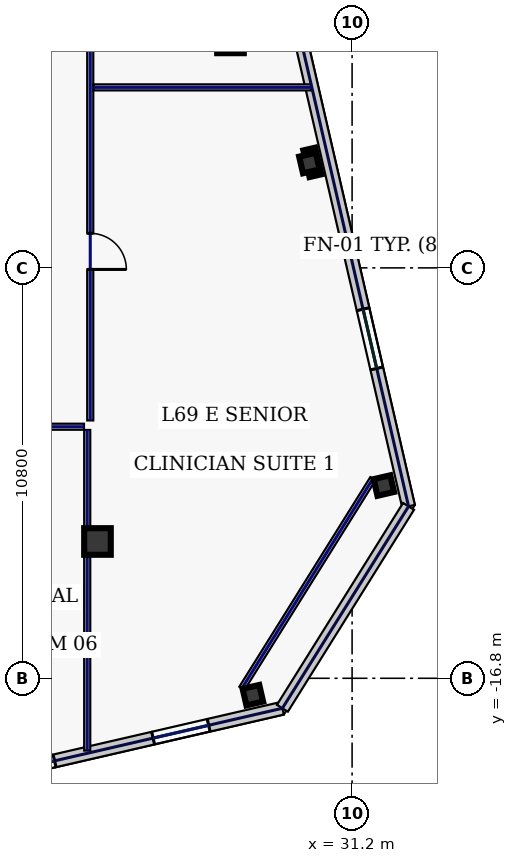
"""IFC4 building model, lengths in metres.
Left out: names, types, materials, properties, quantities, classifications, styles, units other than length and angle.
Written with IfcOpenShell. Run it as: python <this file> out.ifc"""

import sys

from ifc_helpers import new_model, si_unit, direction, frame, frame_2d, origin, origin_2d, place, context, subcontext, project, spatial, rectangle, hollow_rectangle, extrude, element, fill, save


model = new_model("IFC4")
c1 = context("Model", 3, precision=1e-05, world=origin(), true_north=direction((0.0, 1.0)))
c2 = subcontext(c1, "Body", "Model", "MODEL_VIEW")
j1 = project(units=[si_unit("LENGTHUNIT", "METRE"), si_unit("PLANEANGLEUNIT", "RADIAN")], contexts=[c1])
p1 = place(None, origin())
s1 = spatial("IfcSite", under=j1, at=p1, CompositionType="ELEMENT")
p2 = place(p1, origin())
s2 = spatial("IfcBuilding", under=s1, at=p2, CompositionType="ELEMENT")
p3 = place(p2, frame((0.0, 0.0, 297.0)))
s3 = spatial("IfcBuildingStorey", under=s2, at=p3, CompositionType="ELEMENT", Elevation=297.0)
for number, where, z_axis, x_axis in (
    (1, (24.5, -13.2, 0.0), (0.0, 0.0, 1.0), (1.0, 0.0, 0.0)),
    (2, (28.0, 0.0, 0.0), (0.0, 0.0, 1.0), (1.0, 0.0, 0.0)),
):
    element("IfcColumn", number, at=place(p3, frame(where, z_axis=z_axis, x_axis=x_axis)), inside=s3, PredefinedType="COLUMN", context=c2, shape_type="SweptSolid", body=[
        extrude(hollow_rectangle(XDim=0.7, YDim=0.7, WallThickness=0.032, at=origin_2d()), origin(), (0.0, 0.0, 1.0), 3.74),
    ])
for number, where, z_axis, x_axis in (
    (3, (28.589, -17.245, 0.0), (0.0, 0.0, 1.0), (0.974, 0.225, 0.0)),
    (4, (32.036, -11.728, 0.0), (0.0, 0.0, 1.0), (0.974, 0.225, 0.0)),
    (5, (30.077, -3.241, 0.0), (0.0, 0.0, 1.0), (0.974, 0.225, 0.0)),
):
    element("IfcColumn", number, at=place(p3, frame(where, z_axis=z_axis, x_axis=x_axis)), inside=s3, PredefinedType="COLUMN", context=c2, shape_type="SweptSolid", body=[
        extrude(hollow_rectangle(XDim=0.45, YDim=0.45, WallThickness=0.022, at=origin_2d()), origin(), (0.0, 0.0, 1.0), 3.74),
    ])
p4 = place(p3, frame((12.445, -21.495, 0.0), z_axis=(0.0, 0.0, 1.0), x_axis=(0.974369392164, 0.224953967767, 0.0)))
e6 = element("IfcWall", 6, at=p4, inside=s3, PredefinedType="STANDARD", context=c2, shape_type="SweptSolid", body=[
    extrude(rectangle(XDim=17.366, YDim=0.34, at=frame_2d((8.683, 0.0))), origin(), (0.0, 0.0, 1.0), 3.74),
])
p5 = place(p4, frame((2.729, 0.0, 0.9)))
e7 = element("IfcOpeningElement", 7, at=p5, cuts=e6, PredefinedType="OPENING", context=c2, shape_type="SweptSolid", body=[
    extrude(rectangle(XDim=1.5, YDim=2.0, at=frame_2d((0.75, 1.0))), frame((0.0, 0.18, 0.0), z_axis=(0.0, -1.0, 0.0), x_axis=(1.0, 0.0, 0.0)), (0.0, 0.0, 1.0), 0.36),
])
p6 = place(p4, frame((6.24, 0.0, 0.9)))
e8 = element("IfcOpeningElement", 8, at=p6, cuts=e6, PredefinedType="OPENING", context=c2, shape_type="SweptSolid", body=[
    extrude(rectangle(XDim=1.5, YDim=2.0, at=frame_2d((0.75, 1.0))), frame((0.0, 0.18, 0.0), z_axis=(0.0, -1.0, 0.0), x_axis=(1.0, 0.0, 0.0)), (0.0, 0.0, 1.0), 0.36),
])
p7 = place(p4, frame((10.363, 0.0, 0.9)))
e9 = element("IfcOpeningElement", 9, at=p7, cuts=e6, PredefinedType="OPENING", context=c2, shape_type="SweptSolid", body=[
    extrude(rectangle(XDim=0.85, YDim=1.85, at=frame_2d((0.425, 0.925))), frame((0.0, 0.18, 0.0), z_axis=(0.0, -1.0, 0.0), x_axis=(1.0, 0.0, 0.0)), (0.0, 0.0, 1.0), 0.36),
])
p8 = place(p4, frame((13.875, 0.0, 0.9)))
e10 = element("IfcOpeningElement", 10, at=p8, cuts=e6, PredefinedType="OPENING", context=c2, shape_type="SweptSolid", body=[
    extrude(rectangle(XDim=1.5, YDim=2.0, at=frame_2d((0.75, 1.0))), frame((0.0, 0.18, 0.0), z_axis=(0.0, -1.0, 0.0), x_axis=(1.0, 0.0, 0.0)), (0.0, 0.0, 1.0), 0.36),
])
p9 = place(p3, frame((32.686, -12.276, 0.0), z_axis=(0.0, 0.0, 1.0), x_axis=(-0.224953091034, 0.974369594576, 0.0)))
e11 = element("IfcWall", 11, at=p9, inside=s3, PredefinedType="STANDARD", context=c2, shape_type="SweptSolid", body=[
    extrude(rectangle(XDim=36.2, YDim=0.34, at=frame_2d((18.1, 0.0))), origin(), (0.0, 0.0, 1.0), 3.74),
])
p10 = place(p9, frame((3.725, 0.0, 0.58)))
e12 = element("IfcOpeningElement", 12, at=p10, cuts=e11, PredefinedType="OPENING", context=c2, shape_type="SweptSolid", body=[
    extrude(rectangle(XDim=1.6, YDim=2.3, at=frame_2d((0.8, 1.15))), frame((0.0, 0.18, 0.0), z_axis=(0.0, -1.0, 0.0), x_axis=(1.0, 0.0, 0.0)), (0.0, 0.0, 1.0), 0.36),
])
p11 = place(p9, frame((12.775, 0.0, 0.58)))
e13 = element("IfcOpeningElement", 13, at=p11, cuts=e11, PredefinedType="OPENING", context=c2, shape_type="SweptSolid", body=[
    extrude(rectangle(XDim=1.6, YDim=2.3, at=frame_2d((0.8, 1.15))), frame((0.0, 0.18, 0.0), z_axis=(0.0, -1.0, 0.0), x_axis=(1.0, 0.0, 0.0)), (0.0, 0.0, 1.0), 0.36),
])
p12 = place(p9, frame((21.825, 0.0, 0.58)))
e14 = element("IfcOpeningElement", 14, at=p12, cuts=e11, PredefinedType="OPENING", context=c2, shape_type="SweptSolid", body=[
    extrude(rectangle(XDim=1.6, YDim=2.3, at=frame_2d((0.8, 1.15))), frame((0.0, 0.18, 0.0), z_axis=(0.0, -1.0, 0.0), x_axis=(1.0, 0.0, 0.0)), (0.0, 0.0, 1.0), 0.36),
])
p13 = place(p9, frame((30.875, 0.0, 0.58)))
e15 = element("IfcOpeningElement", 15, at=p13, cuts=e11, PredefinedType="OPENING", context=c2, shape_type="SweptSolid", body=[
    extrude(rectangle(XDim=1.6, YDim=2.3, at=frame_2d((0.8, 1.15))), frame((0.0, 0.18, 0.0), z_axis=(0.0, -1.0, 0.0), x_axis=(1.0, 0.0, 0.0)), (0.0, 0.0, 1.0), 0.36),
])
p14 = place(p3, frame((29.366, -17.589, 0.0), z_axis=(0.0, 0.0, 1.0), x_axis=(0.529907862057, 0.848055220921, 0.0)))
e16 = element("IfcWall", 16, at=p14, inside=s3, PredefinedType="STANDARD", context=c2, shape_type="SweptSolid", body=[
    extrude(rectangle(XDim=6.265, YDim=0.34, at=frame_2d((3.132, 0.0))), origin(), (0.0, 0.0, 1.0), 3.74),
])
p15 = place(p3, frame((28.3, -17.065, 0.0), z_axis=(0.0, 0.0, 1.0), x_axis=(0.529914601736, 0.848051009591, 0.0)))
e17 = element("IfcWall", 17, at=p15, inside=s3, PredefinedType="PARTITIONING", context=c2, shape_type="SweptSolid", body=[
    extrude(rectangle(XDim=6.505, YDim=0.16, at=frame_2d((3.253, 0.0))), origin(), (0.0, 0.0, 1.0), 3.74),
])
p16 = place(p3, frame((24.31, 10.115, 0.0), z_axis=(0.0, 0.0, 1.0), x_axis=(0.0, -1.0, 0.0)))
e18 = element("IfcWall", 18, at=p16, inside=s3, PredefinedType="PARTITIONING", context=c2, shape_type="SweptSolid", body=[
    extrude(rectangle(XDim=20.13, YDim=0.16, at=frame_2d((10.065, 0.0))), origin(), (0.0, 0.0, 1.0), 3.74),
])
p17 = place(p16, frame((15.206, 0.0, 0.0)))
e19 = element("IfcOpeningElement", 19, at=p17, cuts=e18, PredefinedType="OPENING", context=c2, shape_type="SweptSolid", body=[
    extrude(rectangle(XDim=0.95, YDim=2.2, at=frame_2d((0.475, 1.1))), frame((0.0, 0.09, 0.0), z_axis=(0.0, -1.0, 0.0), x_axis=(1.0, 0.0, 0.0)), (0.0, 0.0, 1.0), 0.18),
])
p18 = place(p16, frame((5.444, 0.0, 0.0)))
e20 = element("IfcOpeningElement", 20, at=p18, cuts=e18, PredefinedType="OPENING", context=c2, shape_type="SweptSolid", body=[
    extrude(rectangle(XDim=0.95, YDim=2.2, at=frame_2d((0.475, 1.1))), frame((0.0, 0.09, 0.0), z_axis=(0.0, -1.0, 0.0), x_axis=(1.0, 0.0, 0.0)), (0.0, 0.0, 1.0), 0.18),
])
p19 = place(p3, frame((24.145, -10.18, 0.0), z_axis=(0.0, 0.0, 1.0), x_axis=(-1.0, 0.0, 0.0)))
e21 = element("IfcWall", 21, at=p19, inside=s3, PredefinedType="PARTITIONING", context=c2, shape_type="SweptSolid", body=[
    extrude(rectangle(XDim=9.08, YDim=0.16, at=frame_2d((4.54, 0.0))), origin(), (0.0, 0.0, 1.0), 3.74),
])
p20 = place(p19, frame((2.934, 0.0, 0.0)))
e22 = element("IfcOpeningElement", 22, at=p20, cuts=e21, PredefinedType="OPENING", context=c2, shape_type="SweptSolid", body=[
    extrude(rectangle(XDim=0.95, YDim=2.2, at=frame_2d((0.475, 1.1))), frame((0.0, 0.09, 0.0), z_axis=(0.0, -1.0, 0.0), x_axis=(1.0, 0.0, 0.0)), (0.0, 0.0, 1.0), 0.18),
])
p21 = place(p3, frame((24.23, -18.703, 0.0), z_axis=(0.0, 0.0, 1.0), x_axis=(0.0, 1.0, 0.0)))
e23 = element("IfcWall", 23, at=p21, inside=s3, PredefinedType="PARTITIONING", context=c2, shape_type="SweptSolid", body=[
    extrude(rectangle(XDim=8.438, YDim=0.16, at=frame_2d((4.219, 0.0))), origin(), (0.0, 0.0, 1.0), 3.74),
])
p22 = place(p3, frame((24.395, -1.25, 0.0), z_axis=(0.0, 0.0, 1.0), x_axis=(1.0, 0.0, 0.0)))
e24 = element("IfcWall", 24, at=p22, inside=s3, PredefinedType="PARTITIONING", context=c2, shape_type="SweptSolid", body=[
    extrude(rectangle(XDim=5.725, YDim=0.16, at=frame_2d((2.862, 0.0))), origin(), (0.0, 0.0, 1.0), 3.74),
])
p23 = place(p7, origin())
e25 = element("IfcWindow", 25, at=p23, inside=s3, PartitioningType="SINGLE_PANEL", PredefinedType="WINDOW", context=c2, shape_type="SweptSolid", body=[
    extrude(rectangle(XDim=0.85, YDim=1.85, at=frame_2d((0.425, 0.925))), frame((0.0, 0.03, 0.0), z_axis=(0.0, -1.0, 0.0), x_axis=(1.0, 0.0, 0.0)), (0.0, 0.0, 1.0), 0.06),
])
fill(e9, e25)
p24 = place(p8, origin())
e26 = element("IfcWindow", 26, at=p24, inside=s3, PartitioningType="SINGLE_PANEL", PredefinedType="WINDOW", context=c2, shape_type="SweptSolid", body=[
    extrude(rectangle(XDim=1.5, YDim=2.0, at=frame_2d((0.75, 1.0))), frame((0.0, 0.03, 0.0), z_axis=(0.0, -1.0, 0.0), x_axis=(1.0, 0.0, 0.0)), (0.0, 0.0, 1.0), 0.06),
])
fill(e10, e26)
p25 = place(p10, origin())
e27 = element("IfcWindow", 27, at=p25, inside=s3, PartitioningType="SINGLE_PANEL", PredefinedType="WINDOW", context=c2, shape_type="SweptSolid", body=[
    extrude(rectangle(XDim=1.6, YDim=2.3, at=frame_2d((0.8, 1.15))), frame((0.0, 0.03, 0.0), z_axis=(0.0, -1.0, 0.0), x_axis=(1.0, 0.0, 0.0)), (0.0, 0.0, 1.0), 0.06),
])
fill(e12, e27)
p26 = place(p17, origin())
e28 = element("IfcDoor", 28, at=p26, inside=s3, OperationType="SINGLE_SWING_RIGHT", PredefinedType="DOOR", context=c2, shape_type="SweptSolid", body=[
    extrude(rectangle(XDim=0.95, YDim=2.2, at=frame_2d((0.475, 1.1))), frame((0.0, 0.025, 0.0), z_axis=(0.0, -1.0, 0.0), x_axis=(1.0, 0.0, 0.0)), (0.0, 0.0, 1.0), 0.05),
])
fill(e19, e28)
save(model, sys.argv[1])
